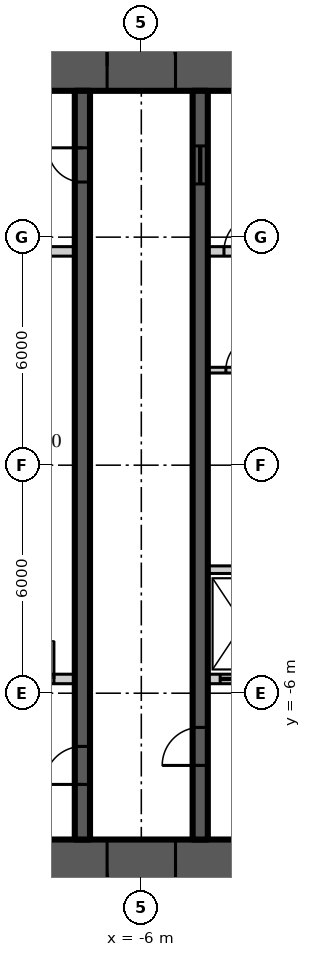
"""IFC4 building model, lengths in metres.
Left out: names, types, materials, properties, quantities, classifications, styles, units other than length and angle.
Written with IfcOpenShell. Run it as: python <this file> out.ifc"""

import sys

from ifc_helpers import new_model, si_unit, direction, frame, frame_2d, origin, place, context, subcontext, project, spatial, rectangle, extrude, element, fill, save


model = new_model("IFC4")
c1 = context("Model", 3, precision=1e-05, world=origin(), true_north=direction((0.0, 1.0)))
c2 = subcontext(c1, "Body", "Model", "MODEL_VIEW")
j1 = project(units=[si_unit("LENGTHUNIT", "METRE"), si_unit("PLANEANGLEUNIT", "RADIAN")], contexts=[c1])
p1 = place(None, origin())
s1 = spatial("IfcSite", under=j1, at=p1, CompositionType="ELEMENT")
p2 = place(p1, origin())
s2 = spatial("IfcBuilding", under=s1, at=p2, CompositionType="ELEMENT")
p3 = place(p2, frame((0.0, 0.0, 243.9)))
s3 = spatial("IfcBuildingStorey", under=s2, at=p3, CompositionType="ELEMENT", Elevation=243.9)
p4 = place(p3, frame((-11.15, 10.5, 0.0), z_axis=(0.0, 0.0, 1.0), x_axis=(1.0, 0.0, 0.0)))
e1 = element("IfcWall", 1, at=p4, inside=s3, PredefinedType="SHEAR", context=c2, shape_type="SweptSolid", body=[
    extrude(rectangle(XDim=22.3, YDim=1.3, at=frame_2d((11.15, 0.0))), origin(), (0.0, 0.0, 1.0), 3.9),
])
p5 = place(p4, frame((4.25, 0.0, 0.0)))
e2 = element("IfcOpeningElement", 2, at=p5, cuts=e1, PredefinedType="OPENING", context=c2, shape_type="SweptSolid", body=[
    extrude(rectangle(XDim=1.8, YDim=2.2, at=frame_2d((0.9, 1.1))), frame((0.0, 0.66, 0.0), z_axis=(0.0, -1.0, 0.0), x_axis=(1.0, 0.0, 0.0)), (0.0, 0.0, 1.0), 1.32),
])
p6 = place(p4, frame((16.25, 0.0, 0.0)))
e3 = element("IfcOpeningElement", 3, at=p6, cuts=e1, PredefinedType="OPENING", context=c2, shape_type="SweptSolid", body=[
    extrude(rectangle(XDim=1.8, YDim=2.2, at=frame_2d((0.9, 1.1))), frame((0.0, 0.66, 0.0), z_axis=(0.0, -1.0, 0.0), x_axis=(1.0, 0.0, 0.0)), (0.0, 0.0, 1.0), 1.32),
])
p7 = place(p3, frame((11.15, -10.5, 0.0), z_axis=(0.0, 0.0, 1.0), x_axis=(-1.0, 0.0, 0.0)))
e4 = element("IfcWall", 4, at=p7, inside=s3, PredefinedType="SHEAR", context=c2, shape_type="SweptSolid", body=[
    extrude(rectangle(XDim=22.3, YDim=1.3, at=frame_2d((11.15, 0.0))), origin(), (0.0, 0.0, 1.0), 3.9),
])
p8 = place(p7, frame((16.25, 0.0, 0.0)))
e5 = element("IfcOpeningElement", 5, at=p8, cuts=e4, PredefinedType="OPENING", context=c2, shape_type="SweptSolid", body=[
    extrude(rectangle(XDim=1.8, YDim=2.2, at=frame_2d((0.9, 1.1))), frame((0.0, 0.66, 0.0), z_axis=(0.0, -1.0, 0.0), x_axis=(1.0, 0.0, 0.0)), (0.0, 0.0, 1.0), 1.32),
])
p9 = place(p7, frame((4.25, 0.0, 0.0)))
e6 = element("IfcOpeningElement", 6, at=p9, cuts=e4, PredefinedType="OPENING", context=c2, shape_type="SweptSolid", body=[
    extrude(rectangle(XDim=1.8, YDim=2.2, at=frame_2d((0.9, 1.1))), frame((0.0, 0.66, 0.0), z_axis=(0.0, -1.0, 0.0), x_axis=(1.0, 0.0, 0.0)), (0.0, 0.0, 1.0), 1.32),
])
p10 = place(p3, frame((-7.55, -9.85, 0.0), z_axis=(0.0, 0.0, 1.0), x_axis=(0.0, 1.0, 0.0)))
e7 = element("IfcWall", 7, at=p10, inside=s3, PredefinedType="SHEAR", context=c2, shape_type="SweptSolid", body=[
    extrude(rectangle(XDim=19.7, YDim=0.4, at=frame_2d((9.85, 0.0))), origin(), (0.0, 0.0, 1.0), 3.9),
])
p11 = place(p10, frame((1.45, 0.0, 0.0)))
e8 = element("IfcOpeningElement", 8, at=p11, cuts=e7, PredefinedType="OPENING", context=c2, shape_type="SweptSolid", body=[
    extrude(rectangle(XDim=1.0, YDim=2.2, at=frame_2d((0.5, 1.1))), frame((0.0, 0.21, 0.0), z_axis=(0.0, -1.0, 0.0), x_axis=(1.0, 0.0, 0.0)), (0.0, 0.0, 1.0), 0.42),
])
p12 = place(p10, frame((17.3, 0.0, 0.0)))
e9 = element("IfcOpeningElement", 9, at=p12, cuts=e7, PredefinedType="OPENING", context=c2, shape_type="SweptSolid", body=[
    extrude(rectangle(XDim=0.9, YDim=2.1, at=frame_2d((0.45, 1.05))), frame((0.0, 0.21, 0.0), z_axis=(0.0, -1.0, 0.0), x_axis=(1.0, 0.0, 0.0)), (0.0, 0.0, 1.0), 0.42),
])
p13 = place(p3, frame((-4.45, -9.85, 0.0), z_axis=(0.0, 0.0, 1.0), x_axis=(0.0, 1.0, 0.0)))
e10 = element("IfcWall", 10, at=p13, inside=s3, PredefinedType="SHEAR", context=c2, shape_type="SweptSolid", body=[
    extrude(rectangle(XDim=19.7, YDim=0.4, at=frame_2d((9.85, 0.0))), origin(), (0.0, 0.0, 1.0), 3.9),
])
p14 = place(p13, frame((1.95, 0.0, 0.0)))
e11 = element("IfcOpeningElement", 11, at=p14, cuts=e10, PredefinedType="OPENING", context=c2, shape_type="SweptSolid", body=[
    extrude(rectangle(XDim=1.0, YDim=2.2, at=frame_2d((0.5, 1.1))), frame((0.0, 0.21, 0.0), z_axis=(0.0, -1.0, 0.0), x_axis=(1.0, 0.0, 0.0)), (0.0, 0.0, 1.0), 0.42),
])
p15 = place(p13, frame((17.25, 0.0, 0.0)))
e12 = element("IfcOpeningElement", 12, at=p15, cuts=e10, PredefinedType="OPENING", context=c2, shape_type="SweptSolid", body=[
    extrude(rectangle(XDim=1.0, YDim=2.1, at=frame_2d((0.5, 1.05))), frame((0.0, 0.21, 0.0), z_axis=(0.0, -1.0, 0.0), x_axis=(1.0, 0.0, 0.0)), (0.0, 0.0, 1.0), 0.42),
])
p16 = place(p3, frame((-9.85, 5.625, 0.0), z_axis=(0.0, 0.0, 1.0), x_axis=(1.0, 0.0, 0.0)))
e13 = element("IfcWall", 13, at=p16, inside=s3, PredefinedType="SOLIDWALL", context=c2, shape_type="SweptSolid", body=[
    extrude(rectangle(XDim=2.1, YDim=0.25, at=frame_2d((1.05, 0.0))), origin(), (0.0, 0.0, 1.0), 3.7),
])
p17 = place(p3, frame((-4.25, 5.625, 0.0), z_axis=(0.0, 0.0, 1.0), x_axis=(1.0, 0.0, 0.0)))
e14 = element("IfcWall", 14, at=p17, inside=s3, PredefinedType="SOLIDWALL", context=c2, shape_type="SweptSolid", body=[
    extrude(rectangle(XDim=1.85, YDim=0.25, at=frame_2d((0.925, 0.0))), origin(), (0.0, 0.0, 1.0), 3.7),
])
p18 = place(p17, frame((0.425, 0.0, 0.0)))
e15 = element("IfcOpeningElement", 15, at=p18, cuts=e14, PredefinedType="OPENING", context=c2, shape_type="SweptSolid", body=[
    extrude(rectangle(XDim=1.0, YDim=2.2, at=frame_2d((0.5, 1.1))), frame((0.0, 0.135, 0.0), z_axis=(0.0, -1.0, 0.0), x_axis=(1.0, 0.0, 0.0)), (0.0, 0.0, 1.0), 0.27),
])
p19 = place(p3, frame((-9.85, -5.625, 0.0), z_axis=(0.0, 0.0, 1.0), x_axis=(1.0, 0.0, 0.0)))
e16 = element("IfcWall", 16, at=p19, inside=s3, PredefinedType="SOLIDWALL", context=c2, shape_type="SweptSolid", body=[
    extrude(rectangle(XDim=2.1, YDim=0.25, at=frame_2d((1.05, 0.0))), origin(), (0.0, 0.0, 1.0), 3.7),
])
p20 = place(p19, frame((0.55, 0.0, 0.0)))
e17 = element("IfcOpeningElement", 17, at=p20, cuts=e16, PredefinedType="OPENING", context=c2, shape_type="SweptSolid", body=[
    extrude(rectangle(XDim=1.0, YDim=2.2, at=frame_2d((0.5, 1.1))), frame((0.0, 0.135, 0.0), z_axis=(0.0, -1.0, 0.0), x_axis=(1.0, 0.0, 0.0)), (0.0, 0.0, 1.0), 0.27),
])
p21 = place(p3, frame((-4.25, -5.625, 0.0), z_axis=(0.0, 0.0, 1.0), x_axis=(1.0, 0.0, 0.0)))
e18 = element("IfcWall", 18, at=p21, inside=s3, PredefinedType="SOLIDWALL", context=c2, shape_type="SweptSolid", body=[
    extrude(rectangle(XDim=1.85, YDim=0.25, at=frame_2d((0.925, 0.0))), origin(), (0.0, 0.0, 1.0), 3.7),
])
p22 = place(p21, frame((0.325, 0.0, 0.0)))
e19 = element("IfcOpeningElement", 19, at=p22, cuts=e18, PredefinedType="OPENING", context=c2, shape_type="SweptSolid", body=[
    extrude(rectangle(XDim=1.2, YDim=2.2, at=frame_2d((0.6, 1.1))), frame((0.0, 0.135, 0.0), z_axis=(0.0, -1.0, 0.0), x_axis=(1.0, 0.0, 0.0)), (0.0, 0.0, 1.0), 0.27),
])
p23 = place(p3, frame((-4.25, -2.75, 0.0), z_axis=(0.0, 0.0, 1.0), x_axis=(1.0, 0.0, 0.0)))
e20 = element("IfcWall", 20, at=p23, inside=s3, PredefinedType="SOLIDWALL", context=c2, shape_type="SweptSolid", body=[
    extrude(rectangle(XDim=1.85, YDim=0.2, at=frame_2d((0.925, 0.0))), origin(), (0.0, 0.0, 1.0), 3.7),
])
p24 = place(p3, frame((-4.25, 2.5, 0.0), z_axis=(0.0, 0.0, 1.0), x_axis=(1.0, 0.0, 0.0)))
e21 = element("IfcWall", 21, at=p24, inside=s3, PredefinedType="SOLIDWALL", context=c2, shape_type="SweptSolid", body=[
    extrude(rectangle(XDim=1.85, YDim=0.15, at=frame_2d((0.925, 0.0))), origin(), (0.0, 0.0, 1.0), 3.77),
])
p25 = place(p24, frame((0.475, 0.0, 0.0)))
e22 = element("IfcOpeningElement", 22, at=p25, cuts=e21, PredefinedType="OPENING", context=c2, shape_type="SweptSolid", body=[
    extrude(rectangle(XDim=0.9, YDim=2.1, at=frame_2d((0.45, 1.05))), frame((0.0, 0.085, 0.0), z_axis=(0.0, -1.0, 0.0), x_axis=(1.0, 0.0, 0.0)), (0.0, 0.0, 1.0), 0.17),
])
p26 = place(p5, origin())
e23 = element("IfcDoor", 23, at=p26, inside=s3, OperationType="DOUBLE_DOOR_DOUBLE_SWING", PredefinedType="DOOR", context=c2, shape_type="SweptSolid", body=[
    extrude(rectangle(XDim=1.8, YDim=2.2, at=frame_2d((0.9, 1.1))), frame((0.0, 0.025, 0.0), z_axis=(0.0, -1.0, 0.0), x_axis=(1.0, 0.0, 0.0)), (0.0, 0.0, 1.0), 0.05),
])
fill(e2, e23)
p27 = place(p8, origin())
e24 = element("IfcDoor", 24, at=p27, inside=s3, OperationType="DOUBLE_DOOR_DOUBLE_SWING", PredefinedType="DOOR", context=c2, shape_type="SweptSolid", body=[
    extrude(rectangle(XDim=1.8, YDim=2.2, at=frame_2d((0.9, 1.1))), frame((0.0, 0.025, 0.0), z_axis=(0.0, -1.0, 0.0), x_axis=(1.0, 0.0, 0.0)), (0.0, 0.0, 1.0), 0.05),
])
fill(e5, e24)
p28 = place(p11, origin())
e25 = element("IfcDoor", 25, at=p28, inside=s3, OperationType="SINGLE_SWING_LEFT", PredefinedType="DOOR", context=c2, shape_type="SweptSolid", body=[
    extrude(rectangle(XDim=1.0, YDim=2.2, at=frame_2d((0.5, 1.1))), frame((0.0, 0.025, 0.0), z_axis=(0.0, -1.0, 0.0), x_axis=(1.0, 0.0, 0.0)), (0.0, 0.0, 1.0), 0.05),
])
fill(e8, e25)
p29 = place(p14, origin())
e26 = element("IfcDoor", 26, at=p29, inside=s3, OperationType="SINGLE_SWING_LEFT", PredefinedType="DOOR", context=c2, shape_type="SweptSolid", body=[
    extrude(rectangle(XDim=1.0, YDim=2.2, at=frame_2d((0.5, 1.1))), frame((0.0, 0.025, 0.0), z_axis=(0.0, -1.0, 0.0), x_axis=(1.0, 0.0, 0.0)), (0.0, 0.0, 1.0), 0.05),
])
fill(e11, e26)
p30 = place(p12, origin())
e27 = element("IfcDoor", 27, at=p30, inside=s3, OperationType="SINGLE_SWING_RIGHT", PredefinedType="DOOR", context=c2, shape_type="SweptSolid", body=[
    extrude(rectangle(XDim=0.9, YDim=2.1, at=frame_2d((0.45, 1.05))), frame((0.0, 0.025, 0.0), z_axis=(0.0, -1.0, 0.0), x_axis=(1.0, 0.0, 0.0)), (0.0, 0.0, 1.0), 0.05),
])
fill(e9, e27)
p31 = place(p15, origin())
e28 = element("IfcDoor", 28, at=p31, inside=s3, OperationType="SLIDING_TO_LEFT", PredefinedType="DOOR", context=c2, shape_type="SweptSolid", body=[
    extrude(rectangle(XDim=1.0, YDim=2.1, at=frame_2d((0.5, 1.05))), frame((0.0, 0.025, 0.0), z_axis=(0.0, -1.0, 0.0), x_axis=(1.0, 0.0, 0.0)), (0.0, 0.0, 1.0), 0.05),
])
fill(e12, e28)
p32 = place(p22, origin())
e29 = element("IfcDoor", 29, at=p32, inside=s3, OperationType="SLIDING_TO_LEFT", PredefinedType="DOOR", context=c2, shape_type="SweptSolid", body=[
    extrude(rectangle(XDim=1.2, YDim=2.2, at=frame_2d((0.6, 1.1))), frame((0.0, 0.025, 0.0), z_axis=(0.0, -1.0, 0.0), x_axis=(1.0, 0.0, 0.0)), (0.0, 0.0, 1.0), 0.05),
])
fill(e19, e29)
p33 = place(p20, origin())
e30 = element("IfcDoor", 30, at=p33, inside=s3, OperationType="SINGLE_SWING_RIGHT", PredefinedType="DOOR", context=c2, shape_type="SweptSolid", body=[
    extrude(rectangle(XDim=1.0, YDim=2.2, at=frame_2d((0.5, 1.1))), frame((0.0, 0.025, 0.0), z_axis=(0.0, -1.0, 0.0), x_axis=(1.0, 0.0, 0.0)), (0.0, 0.0, 1.0), 0.05),
])
fill(e17, e30)
p34 = place(p25, origin())
e31 = element("IfcDoor", 31, at=p34, inside=s3, OperationType="SINGLE_SWING_RIGHT", PredefinedType="DOOR", context=c2, shape_type="SweptSolid", body=[
    extrude(rectangle(XDim=0.9, YDim=2.1, at=frame_2d((0.45, 1.05))), frame((0.0, 0.025, 0.0), z_axis=(0.0, -1.0, 0.0), x_axis=(1.0, 0.0, 0.0)), (0.0, 0.0, 1.0), 0.05),
])
fill(e22, e31)
p35 = place(p18, origin())
e32 = element("IfcDoor", 32, at=p35, inside=s3, OperationType="SINGLE_SWING_RIGHT", PredefinedType="DOOR", context=c2, shape_type="SweptSolid", body=[
    extrude(rectangle(XDim=1.0, YDim=2.2, at=frame_2d((0.5, 1.1))), frame((0.0, 0.025, 0.0), z_axis=(0.0, -1.0, 0.0), x_axis=(1.0, 0.0, 0.0)), (0.0, 0.0, 1.0), 0.05),
])
fill(e15, e32)
save(model, sys.argv[1])
